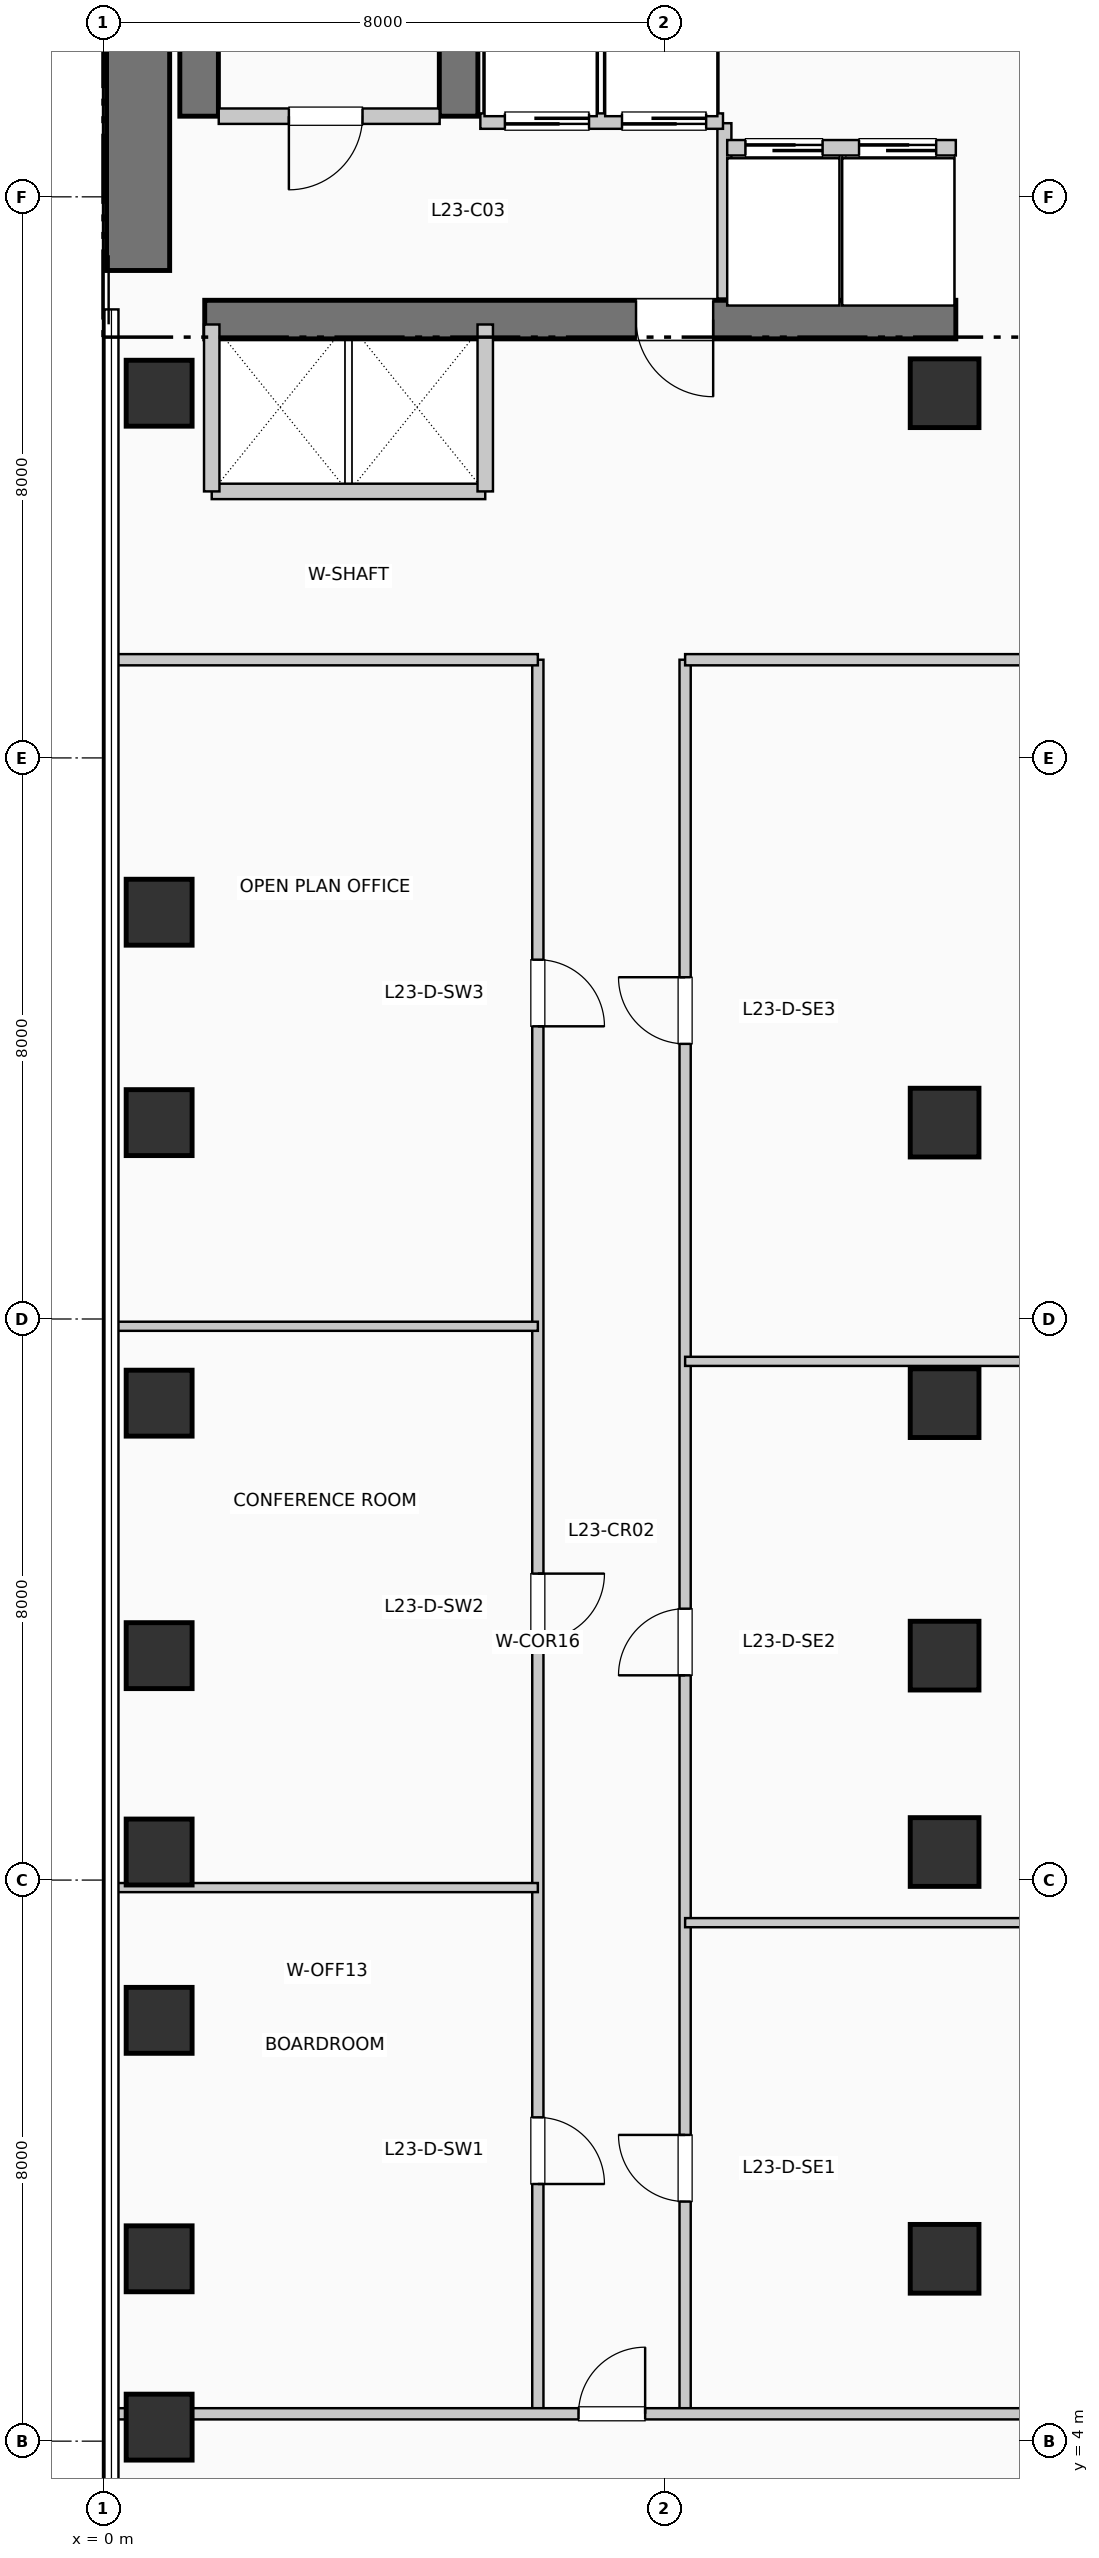
"""IFC4 building model, lengths in metres.
Left out: names, types, materials, properties, quantities, classifications, styles, units other than length and angle.
Written with IfcOpenShell. Run it as: python <this file> out.ifc"""

import sys

from ifc_helpers import new_model, si_unit, direction, frame, frame_2d, origin, origin_2d, place, context, subcontext, project, spatial, rectangle, extrude, element, fill, save


model = new_model("IFC4")
c1 = context("Model", 3, precision=1e-05, world=origin(), true_north=direction((0.0, 1.0)))
c2 = subcontext(c1, "Body", "Model", "MODEL_VIEW")
j1 = project(units=[si_unit("LENGTHUNIT", "METRE"), si_unit("PLANEANGLEUNIT", "RADIAN")], contexts=[c1])
p1 = place(None, origin())
s1 = spatial("IfcSite", under=j1, at=p1, CompositionType="ELEMENT")
p2 = place(p1, origin())
s2 = spatial("IfcBuilding", under=s1, at=p2, CompositionType="ELEMENT")
p3 = place(p2, frame((0.0, 0.0, 98.67)))
s3 = spatial("IfcBuildingStorey", under=s2, at=p3, CompositionType="ELEMENT", Elevation=98.67)
p4 = place(p3, frame((0.5, 34.95, 0.0), z_axis=(0.0, 0.0, 1.0), x_axis=(0.0, 1.0, 0.0)))
e1 = element("IfcWall", 1, at=p4, inside=s3, PredefinedType="SHEAR", context=c2, shape_type="SweptSolid", body=[
    extrude(rectangle(XDim=7.9, YDim=0.9, at=frame_2d((3.95, 0.0))), origin(), (0.0, 0.0, 1.0), 3.96),
])
p5 = place(p3, frame((1.45, 34.25, 0.0), z_axis=(0.0, 0.0, 1.0), x_axis=(1.0, 0.0, 0.0)))
e2 = element("IfcWall", 2, at=p5, inside=s3, PredefinedType="SHEAR", context=c2, shape_type="SweptSolid", body=[
    extrude(rectangle(XDim=10.71, YDim=0.55, at=frame_2d((5.355, 0.0))), origin(), (0.0, 0.0, 1.0), 3.96),
])
p6 = place(p5, frame((7.25, 0.0, 0.0), z_axis=(0.0, 0.0, 1.0), x_axis=(-1.0, 0.0, 0.0)))
e3 = element("IfcOpeningElement", 3, at=p6, cuts=e2, PredefinedType="OPENING", context=c2, shape_type="SweptSolid", body=[
    extrude(rectangle(XDim=1.1, YDim=2.15, at=frame_2d((0.55, 1.075))), frame((0.0, 0.285, 0.0), z_axis=(0.0, -1.0, 0.0), x_axis=(1.0, 0.0, 0.0)), (0.0, 0.0, 1.0), 0.57),
])
for number, where, z_axis, x_axis in (
    (4, (1.37, 37.15, 0.0), (0.0, 0.0, 1.0), (0.0, 1.0, 0.0)),
    (5, (5.07, 37.15, 0.0), (0.0, 0.0, 1.0), (0.0, 1.0, 0.0)),
):
    element("IfcWall", number, at=place(p3, frame(where, z_axis=z_axis, x_axis=x_axis)), inside=s3, PredefinedType="SHEAR", context=c2, shape_type="SweptSolid", body=[
        extrude(rectangle(XDim=7.89, YDim=0.55, at=frame_2d((3.945, 0.0))), origin(), (0.0, 0.0, 1.0), 3.96),
    ])
for number, where, z_axis, x_axis in (
    (6, (0.8, 4.2, 0.0), (0.0, 0.0, 1.0), (1.0, 0.0, 0.0)),
    (7, (0.8, 6.6, 0.0), (0.0, 0.0, 1.0), (1.0, 0.0, 0.0)),
    (8, (0.8, 10.0, 0.0), (0.0, 0.0, 1.0), (1.0, 0.0, 0.0)),
    (9, (0.8, 12.4, 0.0), (0.0, 0.0, 1.0), (1.0, 0.0, 0.0)),
    (10, (0.8, 15.2, 0.0), (0.0, 0.0, 1.0), (1.0, 0.0, 0.0)),
    (11, (0.8, 18.8, 0.0), (0.0, 0.0, 1.0), (1.0, 0.0, 0.0)),
    (12, (0.8, 22.8, 0.0), (0.0, 0.0, 1.0), (1.0, 0.0, 0.0)),
    (13, (0.8, 25.8, 0.0), (0.0, 0.0, 1.0), (1.0, 0.0, 0.0)),
    (14, (0.8, 33.2, 0.0), (0.0, 0.0, 1.0), (1.0, 0.0, 0.0)),
):
    element("IfcColumn", number, at=place(p3, frame(where, z_axis=z_axis, x_axis=x_axis)), inside=s3, PredefinedType="COLUMN", context=c2, shape_type="SweptSolid", body=[
        extrude(rectangle(XDim=0.94, YDim=0.94, at=origin_2d()), origin(), (0.0, 0.0, 1.0), 3.96),
    ])
for number, where, z_axis, x_axis in (
    (15, (12.0, 6.6, 0.0), (0.0, 0.0, 1.0), (1.0, 0.0, 0.0)),
    (16, (12.0, 12.4, 0.0), (0.0, 0.0, 1.0), (1.0, 0.0, 0.0)),
    (17, (12.0, 15.2, 0.0), (0.0, 0.0, 1.0), (1.0, 0.0, 0.0)),
    (18, (12.0, 18.8, 0.0), (0.0, 0.0, 1.0), (1.0, 0.0, 0.0)),
    (19, (12.0, 22.8, 0.0), (0.0, 0.0, 1.0), (1.0, 0.0, 0.0)),
    (20, (12.0, 33.2, 0.0), (0.0, 0.0, 1.0), (1.0, 0.0, 0.0)),
):
    element("IfcColumn", number, at=place(p3, frame(where, z_axis=z_axis, x_axis=x_axis)), inside=s3, PredefinedType="COLUMN", context=c2, shape_type="SweptSolid", body=[
        extrude(rectangle(XDim=0.98, YDim=0.98, at=origin_2d()), origin(), (0.0, 0.0, 1.0), 3.96),
    ])
p7 = place(p3, frame((1.65, 37.15, 0.0), z_axis=(0.0, 0.0, 1.0), x_axis=(1.0, 0.0, 0.0)))
e21 = element("IfcWall", 21, at=p7, inside=s3, PredefinedType="PARTITIONING", context=c2, shape_type="SweptSolid", body=[
    extrude(rectangle(XDim=3.15, YDim=0.22, at=frame_2d((1.575, 0.0))), origin(), (0.0, 0.0, 1.0), 3.71),
])
p8 = place(p7, frame((2.05, 0.0, 0.0), z_axis=(0.0, 0.0, 1.0), x_axis=(-1.0, 0.0, 0.0)))
e22 = element("IfcOpeningElement", 22, at=p8, cuts=e21, PredefinedType="OPENING", context=c2, shape_type="SweptSolid", body=[
    extrude(rectangle(XDim=1.05, YDim=2.15, at=frame_2d((0.525, 1.075))), frame((0.0, 0.12, 0.0), z_axis=(0.0, -1.0, 0.0), x_axis=(1.0, 0.0, 0.0)), (0.0, 0.0, 1.0), 0.24),
])
p9 = place(p3, frame((8.86, 34.55, 0.0), z_axis=(0.0, 0.0, 1.0), x_axis=(0.0, 1.0, 0.0)))
e23 = element("IfcWall", 23, at=p9, inside=s3, PredefinedType="PARTITIONING", context=c2, shape_type="SweptSolid", body=[
    extrude(rectangle(XDim=2.5, YDim=0.2, at=frame_2d((1.25, 0.0))), origin(), (0.0, 0.0, 1.0), 3.71),
])
p10 = place(p3, frame((5.38, 37.08, 0.0), z_axis=(0.0, 0.0, 1.0), x_axis=(1.0, 0.0, 0.0)))
e24 = element("IfcWall", 24, at=p10, inside=s3, PredefinedType="PARTITIONING", context=c2, shape_type="SweptSolid", body=[
    extrude(rectangle(XDim=3.46, YDim=0.22, at=frame_2d((1.73, 0.0))), origin(), (0.0, 0.0, 1.0), 3.71),
])
p11 = place(p10, frame((1.55, 0.0, 0.0), z_axis=(0.0, 0.0, 1.0), x_axis=(-1.0, 0.0, 0.0)))
e25 = element("IfcOpeningElement", 25, at=p11, cuts=e24, PredefinedType="OPENING", context=c2, shape_type="SweptSolid", body=[
    extrude(rectangle(XDim=1.2, YDim=2.2, at=frame_2d((0.6, 1.1))), frame((0.0, 0.12, 0.0), z_axis=(0.0, -1.0, 0.0), x_axis=(1.0, 0.0, 0.0)), (0.0, 0.0, 1.0), 0.24),
])
p12 = place(p10, frame((3.22, 0.0, 0.0), z_axis=(0.0, 0.0, 1.0), x_axis=(-1.0, 0.0, 0.0)))
e26 = element("IfcOpeningElement", 26, at=p12, cuts=e24, PredefinedType="OPENING", context=c2, shape_type="SweptSolid", body=[
    extrude(rectangle(XDim=1.2, YDim=2.2, at=frame_2d((0.6, 1.1))), frame((0.0, 0.12, 0.0), z_axis=(0.0, -1.0, 0.0), x_axis=(1.0, 0.0, 0.0)), (0.0, 0.0, 1.0), 0.24),
])
p13 = place(p3, frame((1.55, 31.8, 0.0), z_axis=(0.0, 0.0, 1.0), x_axis=(1.0, 0.0, 0.0)))
e27 = element("IfcWall", 27, at=p13, inside=s3, PredefinedType="PARTITIONING", context=c2, shape_type="SweptSolid", body=[
    extrude(rectangle(XDim=3.9, YDim=0.22, at=frame_2d((1.95, 0.0))), origin(), (0.0, 0.0, 1.0), 3.71),
])
for number, where, z_axis, x_axis in (
    (28, (1.55, 31.8, 0.0), (0.0, 0.0, 1.0), (0.0, 1.0, 0.0)),
    (29, (5.45, 31.8, 0.0), (0.0, 0.0, 1.0), (0.0, 1.0, 0.0)),
):
    element("IfcWall", number, at=place(p3, frame(where, z_axis=z_axis, x_axis=x_axis)), inside=s3, PredefinedType="PARTITIONING", context=c2, shape_type="SweptSolid", body=[
        extrude(rectangle(XDim=2.38, YDim=0.22, at=frame_2d((1.19, 0.0))), origin(), (0.0, 0.0, 1.0), 3.71),
    ])
p14 = place(p3, frame((8.9, 36.7, 0.0), z_axis=(0.0, 0.0, 1.0), x_axis=(1.0, 0.0, 0.0)))
e30 = element("IfcWall", 30, at=p14, inside=s3, PredefinedType="PARTITIONING", context=c2, shape_type="SweptSolid", body=[
    extrude(rectangle(XDim=3.26, YDim=0.22, at=frame_2d((1.63, 0.0))), origin(), (0.0, 0.0, 1.0), 3.71),
])
p15 = place(p14, frame((0.26, 0.0, 0.0)))
e31 = element("IfcOpeningElement", 31, at=p15, cuts=e30, PredefinedType="OPENING", context=c2, shape_type="SweptSolid", body=[
    extrude(rectangle(XDim=1.1, YDim=2.2, at=frame_2d((0.55, 1.1))), frame((0.0, 0.12, 0.0), z_axis=(0.0, -1.0, 0.0), x_axis=(1.0, 0.0, 0.0)), (0.0, 0.0, 1.0), 0.24),
])
p16 = place(p14, frame((1.88, 0.0, 0.0)))
e32 = element("IfcOpeningElement", 32, at=p16, cuts=e30, PredefinedType="OPENING", context=c2, shape_type="SweptSolid", body=[
    extrude(rectangle(XDim=1.1, YDim=2.2, at=frame_2d((0.55, 1.1))), frame((0.0, 0.12, 0.0), z_axis=(0.0, -1.0, 0.0), x_axis=(1.0, 0.0, 0.0)), (0.0, 0.0, 1.0), 0.24),
])
p17 = place(p3, frame((6.2, 4.39, 0.0), z_axis=(0.0, 0.0, 1.0), x_axis=(0.0, 1.0, 0.0)))
e33 = element("IfcWall", 33, at=p17, inside=s3, PredefinedType="PARTITIONING", context=c2, shape_type="SweptSolid", body=[
    extrude(rectangle(XDim=25.01, YDim=0.16, at=frame_2d((12.505, 0.0))), origin(), (0.0, 0.0, 1.0), 3.71),
])
p18 = place(p17, frame((4.227, 0.0, 0.0), z_axis=(0.0, 0.0, 1.0), x_axis=(-1.0, 0.0, 0.0)))
e34 = element("IfcOpeningElement", 34, at=p18, cuts=e33, PredefinedType="OPENING", context=c2, shape_type="SweptSolid", body=[
    extrude(rectangle(XDim=0.95, YDim=2.15, at=frame_2d((0.475, 1.075))), frame((0.0, 0.09, 0.0), z_axis=(0.0, -1.0, 0.0), x_axis=(1.0, 0.0, 0.0)), (0.0, 0.0, 1.0), 0.18),
])
p19 = place(p17, frame((11.979, 0.0, 0.0), z_axis=(0.0, 0.0, 1.0), x_axis=(-1.0, 0.0, 0.0)))
e35 = element("IfcOpeningElement", 35, at=p19, cuts=e33, PredefinedType="OPENING", context=c2, shape_type="SweptSolid", body=[
    extrude(rectangle(XDim=0.95, YDim=2.15, at=frame_2d((0.475, 1.075))), frame((0.0, 0.09, 0.0), z_axis=(0.0, -1.0, 0.0), x_axis=(1.0, 0.0, 0.0)), (0.0, 0.0, 1.0), 0.18),
])
p20 = place(p17, frame((20.733, 0.0, 0.0), z_axis=(0.0, 0.0, 1.0), x_axis=(-1.0, 0.0, 0.0)))
e36 = element("IfcOpeningElement", 36, at=p20, cuts=e33, PredefinedType="OPENING", context=c2, shape_type="SweptSolid", body=[
    extrude(rectangle(XDim=0.95, YDim=2.15, at=frame_2d((0.475, 1.075))), frame((0.0, 0.09, 0.0), z_axis=(0.0, -1.0, 0.0), x_axis=(1.0, 0.0, 0.0)), (0.0, 0.0, 1.0), 0.18),
])
p21 = place(p3, frame((8.3, 4.39, 0.0), z_axis=(0.0, 0.0, 1.0), x_axis=(0.0, 1.0, 0.0)))
e37 = element("IfcWall", 37, at=p21, inside=s3, PredefinedType="PARTITIONING", context=c2, shape_type="SweptSolid", body=[
    extrude(rectangle(XDim=25.01, YDim=0.16, at=frame_2d((12.505, 0.0))), origin(), (0.0, 0.0, 1.0), 3.71),
])
p22 = place(p21, frame((3.026, 0.0, 0.0)))
e38 = element("IfcOpeningElement", 38, at=p22, cuts=e37, PredefinedType="OPENING", context=c2, shape_type="SweptSolid", body=[
    extrude(rectangle(XDim=0.95, YDim=2.15, at=frame_2d((0.475, 1.075))), frame((0.0, 0.09, 0.0), z_axis=(0.0, -1.0, 0.0), x_axis=(1.0, 0.0, 0.0)), (0.0, 0.0, 1.0), 0.18),
])
p23 = place(p21, frame((10.529, 0.0, 0.0)))
e39 = element("IfcOpeningElement", 39, at=p23, cuts=e37, PredefinedType="OPENING", context=c2, shape_type="SweptSolid", body=[
    extrude(rectangle(XDim=0.95, YDim=2.15, at=frame_2d((0.475, 1.075))), frame((0.0, 0.09, 0.0), z_axis=(0.0, -1.0, 0.0), x_axis=(1.0, 0.0, 0.0)), (0.0, 0.0, 1.0), 0.18),
])
p24 = place(p21, frame((19.533, 0.0, 0.0)))
e40 = element("IfcOpeningElement", 40, at=p24, cuts=e37, PredefinedType="OPENING", context=c2, shape_type="SweptSolid", body=[
    extrude(rectangle(XDim=0.95, YDim=2.15, at=frame_2d((0.475, 1.075))), frame((0.0, 0.09, 0.0), z_axis=(0.0, -1.0, 0.0), x_axis=(1.0, 0.0, 0.0)), (0.0, 0.0, 1.0), 0.18),
])
p25 = place(p3, frame((0.19, 4.39, 0.0), z_axis=(0.0, 0.0, 1.0), x_axis=(1.0, 0.0, 0.0)))
e41 = element("IfcWall", 41, at=p25, inside=s3, PredefinedType="PARTITIONING", context=c2, shape_type="SweptSolid", body=[
    extrude(rectangle(XDim=23.26, YDim=0.16, at=frame_2d((11.63, 0.0))), origin(), (0.0, 0.0, 1.0), 2.995),
])
p26 = place(p25, frame((6.59, 0.0, 0.0)))
e42 = element("IfcOpeningElement", 42, at=p26, cuts=e41, PredefinedType="OPENING", context=c2, shape_type="SweptSolid", body=[
    extrude(rectangle(XDim=0.95, YDim=2.15, at=frame_2d((0.475, 1.075))), frame((0.0, 0.09, 0.0), z_axis=(0.0, -1.0, 0.0), x_axis=(1.0, 0.0, 0.0)), (0.0, 0.0, 1.0), 0.18),
])
p27 = place(p3, frame((0.19, 29.4, 0.0), z_axis=(0.0, 0.0, 1.0), x_axis=(1.0, 0.0, 0.0)))
e43 = element("IfcWall", 43, at=p27, inside=s3, PredefinedType="PARTITIONING", context=c2, shape_type="SweptSolid", body=[
    extrude(rectangle(XDim=6.01, YDim=0.16, at=frame_2d((3.005, 0.0))), origin(), (0.0, 0.0, 1.0), 3.365),
])
p28 = place(p3, frame((8.3, 29.4, 0.0), z_axis=(0.0, 0.0, 1.0), x_axis=(1.0, 0.0, 0.0)))
e44 = element("IfcWall", 44, at=p28, inside=s3, PredefinedType="PARTITIONING", context=c2, shape_type="SweptSolid", body=[
    extrude(rectangle(XDim=15.15, YDim=0.16, at=frame_2d((7.575, 0.0))), origin(), (0.0, 0.0, 1.0), 3.365),
])
for number, where, z_axis, x_axis in (
    (45, (0.19, 11.893, 0.0), (0.0, 0.0, 1.0), (1.0, 0.0, 0.0)),
    (46, (0.19, 19.896, 0.0), (0.0, 0.0, 1.0), (1.0, 0.0, 0.0)),
):
    element("IfcWall", number, at=place(p3, frame(where, z_axis=z_axis, x_axis=x_axis)), inside=s3, PredefinedType="PARTITIONING", context=c2, shape_type="SweptSolid", body=[
        extrude(rectangle(XDim=6.01, YDim=0.13, at=frame_2d((3.005, 0.0))), origin(), (0.0, 0.0, 1.0), 3.71),
    ])
for number, where, z_axis, x_axis in (
    (47, (8.3, 11.393, 0.0), (0.0, 0.0, 1.0), (1.0, 0.0, 0.0)),
    (48, (8.3, 19.396, 0.0), (0.0, 0.0, 1.0), (1.0, 0.0, 0.0)),
):
    element("IfcWall", number, at=place(p3, frame(where, z_axis=z_axis, x_axis=x_axis)), inside=s3, PredefinedType="PARTITIONING", context=c2, shape_type="SweptSolid", body=[
        extrude(rectangle(XDim=15.15, YDim=0.13, at=frame_2d((7.575, 0.0))), origin(), (0.0, 0.0, 1.0), 3.71),
    ])
p29 = place(p8, origin())
e49 = element("IfcDoor", 49, at=p29, inside=s3, OperationType="SINGLE_SWING_LEFT", PredefinedType="DOOR", context=c2, shape_type="SweptSolid", body=[
    extrude(rectangle(XDim=1.05, YDim=2.15, at=frame_2d((0.525, 1.075))), frame((0.0, 0.025, 0.0), z_axis=(0.0, -1.0, 0.0), x_axis=(1.0, 0.0, 0.0)), (0.0, 0.0, 1.0), 0.05),
])
fill(e22, e49)
p30 = place(p6, origin())
e50 = element("IfcDoor", 50, at=p30, inside=s3, OperationType="SINGLE_SWING_RIGHT", PredefinedType="DOOR", context=c2, shape_type="SweptSolid", body=[
    extrude(rectangle(XDim=1.1, YDim=2.15, at=frame_2d((0.55, 1.075))), frame((0.0, 0.025, 0.0), z_axis=(0.0, -1.0, 0.0), x_axis=(1.0, 0.0, 0.0)), (0.0, 0.0, 1.0), 0.05),
])
fill(e3, e50)
p31 = place(p11, origin())
e51 = element("IfcDoor", 51, at=p31, inside=s3, OperationType="SLIDING_TO_RIGHT", PredefinedType="DOOR", context=c2, shape_type="SweptSolid", body=[
    extrude(rectangle(XDim=1.2, YDim=2.2, at=frame_2d((0.6, 1.1))), frame((0.0, 0.025, 0.0), z_axis=(0.0, -1.0, 0.0), x_axis=(1.0, 0.0, 0.0)), (0.0, 0.0, 1.0), 0.05),
])
fill(e25, e51)
p32 = place(p12, origin())
e52 = element("IfcDoor", 52, at=p32, inside=s3, OperationType="SLIDING_TO_RIGHT", PredefinedType="DOOR", context=c2, shape_type="SweptSolid", body=[
    extrude(rectangle(XDim=1.2, YDim=2.2, at=frame_2d((0.6, 1.1))), frame((0.0, 0.025, 0.0), z_axis=(0.0, -1.0, 0.0), x_axis=(1.0, 0.0, 0.0)), (0.0, 0.0, 1.0), 0.05),
])
fill(e26, e52)
p33 = place(p15, origin())
e53 = element("IfcDoor", 53, at=p33, inside=s3, OperationType="SLIDING_TO_LEFT", PredefinedType="DOOR", context=c2, shape_type="SweptSolid", body=[
    extrude(rectangle(XDim=1.1, YDim=2.2, at=frame_2d((0.55, 1.1))), frame((0.0, 0.025, 0.0), z_axis=(0.0, -1.0, 0.0), x_axis=(1.0, 0.0, 0.0)), (0.0, 0.0, 1.0), 0.05),
])
fill(e31, e53)
p34 = place(p16, origin())
e54 = element("IfcDoor", 54, at=p34, inside=s3, OperationType="SLIDING_TO_LEFT", PredefinedType="DOOR", context=c2, shape_type="SweptSolid", body=[
    extrude(rectangle(XDim=1.1, YDim=2.2, at=frame_2d((0.55, 1.1))), frame((0.0, 0.025, 0.0), z_axis=(0.0, -1.0, 0.0), x_axis=(1.0, 0.0, 0.0)), (0.0, 0.0, 1.0), 0.05),
])
fill(e32, e54)
p35 = place(p26, origin())
e55 = element("IfcDoor", 55, at=p35, inside=s3, OperationType="SINGLE_SWING_RIGHT", PredefinedType="DOOR", context=c2, shape_type="SweptSolid", body=[
    extrude(rectangle(XDim=0.95, YDim=2.15, at=frame_2d((0.475, 1.075))), frame((0.0, 0.025, 0.0), z_axis=(0.0, -1.0, 0.0), x_axis=(1.0, 0.0, 0.0)), (0.0, 0.0, 1.0), 0.05),
])
fill(e42, e55)
p36 = place(p18, origin())
e56 = element("IfcDoor", 56, at=p36, inside=s3, OperationType="SINGLE_SWING_LEFT", PredefinedType="DOOR", context=c2, shape_type="SweptSolid", body=[
    extrude(rectangle(XDim=0.95, YDim=2.15, at=frame_2d((0.475, 1.075))), frame((0.0, 0.025, 0.0), z_axis=(0.0, -1.0, 0.0), x_axis=(1.0, 0.0, 0.0)), (0.0, 0.0, 1.0), 0.05),
])
fill(e34, e56)
p37 = place(p19, origin())
e57 = element("IfcDoor", 57, at=p37, inside=s3, OperationType="SINGLE_SWING_RIGHT", PredefinedType="DOOR", context=c2, shape_type="SweptSolid", body=[
    extrude(rectangle(XDim=0.95, YDim=2.15, at=frame_2d((0.475, 1.075))), frame((0.0, 0.025, 0.0), z_axis=(0.0, -1.0, 0.0), x_axis=(1.0, 0.0, 0.0)), (0.0, 0.0, 1.0), 0.05),
])
fill(e35, e57)
p38 = place(p20, origin())
e58 = element("IfcDoor", 58, at=p38, inside=s3, OperationType="SINGLE_SWING_LEFT", PredefinedType="DOOR", context=c2, shape_type="SweptSolid", body=[
    extrude(rectangle(XDim=0.95, YDim=2.15, at=frame_2d((0.475, 1.075))), frame((0.0, 0.025, 0.0), z_axis=(0.0, -1.0, 0.0), x_axis=(1.0, 0.0, 0.0)), (0.0, 0.0, 1.0), 0.05),
])
fill(e36, e58)
p39 = place(p22, origin())
e59 = element("IfcDoor", 59, at=p39, inside=s3, OperationType="SINGLE_SWING_RIGHT", PredefinedType="DOOR", context=c2, shape_type="SweptSolid", body=[
    extrude(rectangle(XDim=0.95, YDim=2.15, at=frame_2d((0.475, 1.075))), frame((0.0, 0.025, 0.0), z_axis=(0.0, -1.0, 0.0), x_axis=(1.0, 0.0, 0.0)), (0.0, 0.0, 1.0), 0.05),
])
fill(e38, e59)
p40 = place(p23, origin())
e60 = element("IfcDoor", 60, at=p40, inside=s3, OperationType="SINGLE_SWING_LEFT", PredefinedType="DOOR", context=c2, shape_type="SweptSolid", body=[
    extrude(rectangle(XDim=0.95, YDim=2.15, at=frame_2d((0.475, 1.075))), frame((0.0, 0.025, 0.0), z_axis=(0.0, -1.0, 0.0), x_axis=(1.0, 0.0, 0.0)), (0.0, 0.0, 1.0), 0.05),
])
fill(e39, e60)
p41 = place(p24, origin())
e61 = element("IfcDoor", 61, at=p41, inside=s3, OperationType="SINGLE_SWING_RIGHT", PredefinedType="DOOR", context=c2, shape_type="SweptSolid", body=[
    extrude(rectangle(XDim=0.95, YDim=2.15, at=frame_2d((0.475, 1.075))), frame((0.0, 0.025, 0.0), z_axis=(0.0, -1.0, 0.0), x_axis=(1.0, 0.0, 0.0)), (0.0, 0.0, 1.0), 0.05),
])
fill(e40, e61)
save(model, sys.argv[1])
